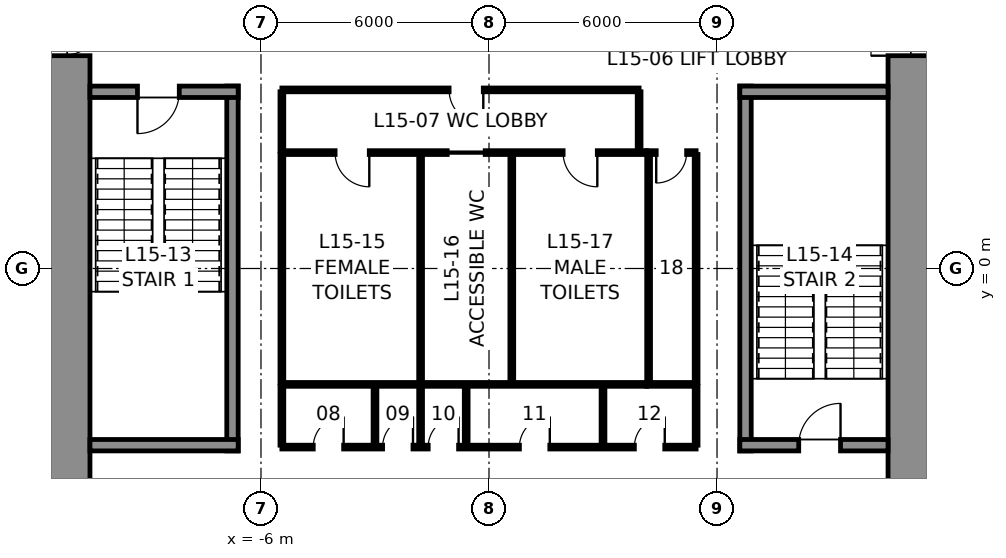
"""IFC4 building model, lengths in metres.
Left out: names, types, materials, properties, quantities, classifications, styles, units other than length and angle.
Written with IfcOpenShell. Run it as: python <this file> out.ifc"""

import sys

from ifc_helpers import new_model, si_unit, direction, frame, frame_2d, origin, place, context, subcontext, project, spatial, rectangle, extrude, element, fill, save


model = new_model("IFC4")
c1 = context("Model", 3, precision=1e-05, world=origin(), true_north=direction((0.0, 1.0)))
c2 = subcontext(c1, "Body", "Model", "MODEL_VIEW")
j1 = project(units=[si_unit("LENGTHUNIT", "METRE"), si_unit("PLANEANGLEUNIT", "RADIAN")], contexts=[c1])
p1 = place(None, origin())
s1 = spatial("IfcSite", under=j1, at=p1, CompositionType="ELEMENT")
p2 = place(p1, origin())
s2 = spatial("IfcBuilding", under=s1, at=p2, CompositionType="ELEMENT")
p3 = place(p2, frame((0.0, 0.0, 81.0)))
s3 = spatial("IfcBuildingStorey", under=s2, at=p3, CompositionType="ELEMENT", Elevation=81.0)
p4 = place(p3, frame((11.25, 10.5, 0.0), z_axis=(0.0, 0.0, 1.0), x_axis=(0.0, -1.0, 0.0)))
e1 = element("IfcWall", 1, at=p4, inside=s3, PredefinedType="SHEAR", context=c2, shape_type="SweptSolid", body=[
    extrude(rectangle(XDim=21.0, YDim=1.5, at=frame_2d((10.5, 0.0))), origin(), (0.0, 0.0, 1.0), 5.0),
])
p5 = place(p4, frame((3.7, 0.0, 0.0)))
e2 = element("IfcOpeningElement", 2, at=p5, cuts=e1, PredefinedType="OPENING", context=c2, shape_type="SweptSolid", body=[
    extrude(rectangle(XDim=1.2, YDim=2.3, at=frame_2d((0.6, 1.15))), frame((0.0, 0.76, 0.0), z_axis=(0.0, -1.0, 0.0), x_axis=(1.0, 0.0, 0.0)), (0.0, 0.0, 1.0), 1.52),
])
p6 = place(p4, frame((16.1, 0.0, 0.0)))
e3 = element("IfcOpeningElement", 3, at=p6, cuts=e1, PredefinedType="OPENING", context=c2, shape_type="SweptSolid", body=[
    extrude(rectangle(XDim=1.2, YDim=2.3, at=frame_2d((0.6, 1.15))), frame((0.0, 0.76, 0.0), z_axis=(0.0, -1.0, 0.0), x_axis=(1.0, 0.0, 0.0)), (0.0, 0.0, 1.0), 1.52),
])
p7 = place(p3, frame((-11.25, -10.5, 0.0), z_axis=(0.0, 0.0, 1.0), x_axis=(0.0, 1.0, 0.0)))
e4 = element("IfcWall", 4, at=p7, inside=s3, PredefinedType="SHEAR", context=c2, shape_type="SweptSolid", body=[
    extrude(rectangle(XDim=21.0, YDim=1.5, at=frame_2d((10.5, 0.0))), origin(), (0.0, 0.0, 1.0), 5.0),
])
p8 = place(p7, frame((16.1, 0.0, 0.0)))
e5 = element("IfcOpeningElement", 5, at=p8, cuts=e4, PredefinedType="OPENING", context=c2, shape_type="SweptSolid", body=[
    extrude(rectangle(XDim=1.2, YDim=2.3, at=frame_2d((0.6, 1.15))), frame((0.0, 0.76, 0.0), z_axis=(0.0, -1.0, 0.0), x_axis=(1.0, 0.0, 0.0)), (0.0, 0.0, 1.0), 1.52),
])
p9 = place(p7, frame((3.7, 0.0, 0.0)))
e6 = element("IfcOpeningElement", 6, at=p9, cuts=e4, PredefinedType="OPENING", context=c2, shape_type="SweptSolid", body=[
    extrude(rectangle(XDim=1.2, YDim=2.3, at=frame_2d((0.6, 1.15))), frame((0.0, 0.76, 0.0), z_axis=(0.0, -1.0, 0.0), x_axis=(1.0, 0.0, 0.0)), (0.0, 0.0, 1.0), 1.52),
])
p10 = place(p3, frame((-6.75, -4.8, 0.0), z_axis=(0.0, 0.0, 1.0), x_axis=(0.0, 1.0, 0.0)))
e7 = element("IfcWall", 7, at=p10, inside=s3, PredefinedType="SOLIDWALL", context=c2, shape_type="SweptSolid", body=[
    extrude(rectangle(XDim=9.6, YDim=0.3, at=frame_2d((4.8, 0.0))), origin(), (0.0, 0.0, 1.0), 4.75),
])
p11 = place(p3, frame((-10.5, 4.65, 0.0), z_axis=(0.0, 0.0, 1.0), x_axis=(1.0, 0.0, 0.0)))
e8 = element("IfcWall", 8, at=p11, inside=s3, PredefinedType="SOLIDWALL", context=c2, shape_type="SweptSolid", body=[
    extrude(rectangle(XDim=3.9, YDim=0.3, at=frame_2d((1.95, 0.0))), origin(), (0.0, 0.0, 1.0), 4.75),
])
p12 = place(p11, frame((1.25, 0.0, 0.0)))
e9 = element("IfcOpeningElement", 9, at=p12, cuts=e8, PredefinedType="OPENING", context=c2, shape_type="SweptSolid", body=[
    extrude(rectangle(XDim=1.1, YDim=2.3, at=frame_2d((0.55, 1.15))), frame((0.0, 0.16, 0.0), z_axis=(0.0, -1.0, 0.0), x_axis=(1.0, 0.0, 0.0)), (0.0, 0.0, 1.0), 0.32),
])
p13 = place(p3, frame((-6.6, -4.65, 0.0), z_axis=(0.0, 0.0, 1.0), x_axis=(-1.0, 0.0, 0.0)))
e10 = element("IfcWall", 10, at=p13, inside=s3, PredefinedType="SOLIDWALL", context=c2, shape_type="SweptSolid", body=[
    extrude(rectangle(XDim=3.9, YDim=0.3, at=frame_2d((1.95, 0.0))), origin(), (0.0, 0.0, 1.0), 4.75),
])
p14 = place(p3, frame((6.75, -4.8, 0.0), z_axis=(0.0, 0.0, 1.0), x_axis=(0.0, 1.0, 0.0)))
e11 = element("IfcWall", 11, at=p14, inside=s3, PredefinedType="SOLIDWALL", context=c2, shape_type="SweptSolid", body=[
    extrude(rectangle(XDim=9.6, YDim=0.3, at=frame_2d((4.8, 0.0))), origin(), (0.0, 0.0, 1.0), 4.75),
])
p15 = place(p3, frame((6.6, 4.65, 0.0), z_axis=(0.0, 0.0, 1.0), x_axis=(1.0, 0.0, 0.0)))
e12 = element("IfcWall", 12, at=p15, inside=s3, PredefinedType="SOLIDWALL", context=c2, shape_type="SweptSolid", body=[
    extrude(rectangle(XDim=3.9, YDim=0.3, at=frame_2d((1.95, 0.0))), origin(), (0.0, 0.0, 1.0), 4.75),
])
p16 = place(p3, frame((10.5, -4.65, 0.0), z_axis=(0.0, 0.0, 1.0), x_axis=(-1.0, 0.0, 0.0)))
e13 = element("IfcWall", 13, at=p16, inside=s3, PredefinedType="SOLIDWALL", context=c2, shape_type="SweptSolid", body=[
    extrude(rectangle(XDim=3.9, YDim=0.3, at=frame_2d((1.95, 0.0))), origin(), (0.0, 0.0, 1.0), 4.75),
])
p17 = place(p16, frame((1.25, 0.0, 0.0)))
e14 = element("IfcOpeningElement", 14, at=p17, cuts=e13, PredefinedType="OPENING", context=c2, shape_type="SweptSolid", body=[
    extrude(rectangle(XDim=1.1, YDim=2.3, at=frame_2d((0.55, 1.15))), frame((0.0, 0.16, 0.0), z_axis=(0.0, -1.0, 0.0), x_axis=(1.0, 0.0, 0.0)), (0.0, 0.0, 1.0), 0.32),
])
p18 = place(p3, frame((-5.45, 3.05, 0.0), z_axis=(0.0, 0.0, 1.0), x_axis=(1.0, 0.0, 0.0)))
e15 = element("IfcWall", 15, at=p18, inside=s3, PredefinedType="PARTITIONING", context=c2, shape_type="SweptSolid", body=[
    extrude(rectangle(XDim=9.6, YDim=0.1, at=frame_2d((4.8, 0.0))), origin(), (0.0, 0.0, 1.0), 4.75),
])
p19 = place(p18, frame((1.4, 0.0, 0.0)))
e16 = element("IfcOpeningElement", 16, at=p19, cuts=e15, PredefinedType="OPENING", context=c2, shape_type="SweptSolid", body=[
    extrude(rectangle(XDim=0.9, YDim=2.3, at=frame_2d((0.45, 1.15))), frame((0.0, 0.06, 0.0), z_axis=(0.0, -1.0, 0.0), x_axis=(1.0, 0.0, 0.0)), (0.0, 0.0, 1.0), 0.12),
])
p20 = place(p18, frame((4.35, 0.0, 0.0)))
e17 = element("IfcOpeningElement", 17, at=p20, cuts=e15, PredefinedType="OPENING", context=c2, shape_type="SweptSolid", body=[
    extrude(rectangle(XDim=1.0, YDim=2.3, at=frame_2d((0.5, 1.15))), frame((0.0, 0.06, 0.0), z_axis=(0.0, -1.0, 0.0), x_axis=(1.0, 0.0, 0.0)), (0.0, 0.0, 1.0), 0.12),
])
p21 = place(p18, frame((7.4, 0.0, 0.0)))
e18 = element("IfcOpeningElement", 18, at=p21, cuts=e15, PredefinedType="OPENING", context=c2, shape_type="SweptSolid", body=[
    extrude(rectangle(XDim=0.9, YDim=2.3, at=frame_2d((0.45, 1.15))), frame((0.0, 0.06, 0.0), z_axis=(0.0, -1.0, 0.0), x_axis=(1.0, 0.0, 0.0)), (0.0, 0.0, 1.0), 0.12),
])
p22 = place(p3, frame((4.15, 3.05, 0.0), z_axis=(0.0, 0.0, 1.0), x_axis=(1.0, 0.0, 0.0)))
e19 = element("IfcWall", 19, at=p22, inside=s3, PredefinedType="PARTITIONING", context=c2, shape_type="SweptSolid", body=[
    extrude(rectangle(XDim=1.3, YDim=0.1, at=frame_2d((0.65, 0.0))), origin(), (0.0, 0.0, 1.0), 4.75),
])
p23 = place(p22, frame((0.25, 0.0, 0.0)))
e20 = element("IfcOpeningElement", 20, at=p23, cuts=e19, PredefinedType="OPENING", context=c2, shape_type="SweptSolid", body=[
    extrude(rectangle(XDim=0.8, YDim=2.3, at=frame_2d((0.4, 1.15))), frame((0.0, 0.06, 0.0), z_axis=(0.0, -1.0, 0.0), x_axis=(1.0, 0.0, 0.0)), (0.0, 0.0, 1.0), 0.12),
])
p24 = place(p3, frame((4.15, -3.05, 0.0), z_axis=(0.0, 0.0, 1.0), x_axis=(-1.0, 0.0, 0.0)))
e21 = element("IfcWall", 21, at=p24, inside=s3, PredefinedType="PARTITIONING", context=c2, shape_type="SweptSolid", body=[
    extrude(rectangle(XDim=9.6, YDim=0.1, at=frame_2d((4.8, 0.0))), origin(), (0.0, 0.0, 1.0), 4.75),
])
p25 = place(p3, frame((5.45, -3.05, 0.0), z_axis=(0.0, 0.0, 1.0), x_axis=(-1.0, 0.0, 0.0)))
e22 = element("IfcWall", 22, at=p25, inside=s3, PredefinedType="PARTITIONING", context=c2, shape_type="SweptSolid", body=[
    extrude(rectangle(XDim=1.3, YDim=0.1, at=frame_2d((0.65, 0.0))), origin(), (0.0, 0.0, 1.0), 4.75),
])
for number, where, z_axis, x_axis in (
    (23, (5.45, 3.0, 0.0), (0.0, 0.0, 1.0), (0.0, -1.0, 0.0)),
    (24, (-5.45, -3.0, 0.0), (0.0, 0.0, 1.0), (0.0, 1.0, 0.0)),
    (25, (-1.8, -3.0, 0.0), (0.0, 0.0, 1.0), (0.0, 1.0, 0.0)),
    (26, (0.6, -3.0, 0.0), (0.0, 0.0, 1.0), (0.0, 1.0, 0.0)),
    (27, (4.2, -3.0, 0.0), (0.0, 0.0, 1.0), (0.0, 1.0, 0.0)),
):
    element("IfcWall", number, at=place(p3, frame(where, z_axis=z_axis, x_axis=x_axis)), inside=s3, PredefinedType="PARTITIONING", context=c2, shape_type="SweptSolid", body=[
        extrude(rectangle(XDim=6.0, YDim=0.1, at=frame_2d((3.0, 0.0))), origin(), (0.0, 0.0, 1.0), 4.75),
    ])
p26 = place(p3, frame((-5.45, 4.7, 0.0), z_axis=(0.0, 0.0, 1.0), x_axis=(1.0, 0.0, 0.0)))
e28 = element("IfcWall", 28, at=p26, inside=s3, PredefinedType="PARTITIONING", context=c2, shape_type="SweptSolid", body=[
    extrude(rectangle(XDim=9.4, YDim=0.1, at=frame_2d((4.7, 0.0))), origin(), (0.0, 0.0, 1.0), 4.75),
])
p27 = place(p26, frame((4.4, 0.0, 0.0)))
e29 = element("IfcOpeningElement", 29, at=p27, cuts=e28, PredefinedType="OPENING", context=c2, shape_type="SweptSolid", body=[
    extrude(rectangle(XDim=0.9, YDim=2.3, at=frame_2d((0.45, 1.15))), frame((0.0, 0.06, 0.0), z_axis=(0.0, -1.0, 0.0), x_axis=(1.0, 0.0, 0.0)), (0.0, 0.0, 1.0), 0.12),
])
for number, where, z_axis, x_axis in (
    (30, (-5.45, 3.1, 0.0), (0.0, 0.0, 1.0), (0.0, 1.0, 0.0)),
    (31, (3.95, 3.1, 0.0), (0.0, 0.0, 1.0), (0.0, 1.0, 0.0)),
):
    element("IfcWall", number, at=place(p3, frame(where, z_axis=z_axis, x_axis=x_axis)), inside=s3, PredefinedType="PARTITIONING", context=c2, shape_type="SweptSolid", body=[
        extrude(rectangle(XDim=1.55, YDim=0.1, at=frame_2d((0.775, 0.0))), origin(), (0.0, 0.0, 1.0), 4.75),
    ])
p28 = place(p3, frame((5.45, -4.7, 0.0), z_axis=(0.0, 0.0, 1.0), x_axis=(-1.0, 0.0, 0.0)))
e32 = element("IfcWall", 32, at=p28, inside=s3, PredefinedType="PARTITIONING", context=c2, shape_type="SweptSolid", body=[
    extrude(rectangle(XDim=10.9, YDim=0.1, at=frame_2d((5.45, 0.0))), origin(), (0.0, 0.0, 1.0), 4.75),
])
p29 = place(p28, frame((9.275, 0.0, 0.0)))
e33 = element("IfcOpeningElement", 33, at=p29, cuts=e32, PredefinedType="OPENING", context=c2, shape_type="SweptSolid", body=[
    extrude(rectangle(XDim=0.8, YDim=2.3, at=frame_2d((0.4, 1.15))), frame((0.0, 0.06, 0.0), z_axis=(0.0, -1.0, 0.0), x_axis=(1.0, 0.0, 0.0)), (0.0, 0.0, 1.0), 0.12),
])
p30 = place(p28, frame((7.45, 0.0, 0.0)))
e34 = element("IfcOpeningElement", 34, at=p30, cuts=e32, PredefinedType="OPENING", context=c2, shape_type="SweptSolid", body=[
    extrude(rectangle(XDim=0.8, YDim=2.3, at=frame_2d((0.4, 1.15))), frame((0.0, 0.06, 0.0), z_axis=(0.0, -1.0, 0.0), x_axis=(1.0, 0.0, 0.0)), (0.0, 0.0, 1.0), 0.12),
])
p31 = place(p28, frame((6.25, 0.0, 0.0)))
e35 = element("IfcOpeningElement", 35, at=p31, cuts=e32, PredefinedType="OPENING", context=c2, shape_type="SweptSolid", body=[
    extrude(rectangle(XDim=0.8, YDim=2.3, at=frame_2d((0.4, 1.15))), frame((0.0, 0.06, 0.0), z_axis=(0.0, -1.0, 0.0), x_axis=(1.0, 0.0, 0.0)), (0.0, 0.0, 1.0), 0.12),
])
p32 = place(p28, frame((3.85, 0.0, 0.0)))
e36 = element("IfcOpeningElement", 36, at=p32, cuts=e32, PredefinedType="OPENING", context=c2, shape_type="SweptSolid", body=[
    extrude(rectangle(XDim=0.8, YDim=2.3, at=frame_2d((0.4, 1.15))), frame((0.0, 0.06, 0.0), z_axis=(0.0, -1.0, 0.0), x_axis=(1.0, 0.0, 0.0)), (0.0, 0.0, 1.0), 0.12),
])
p33 = place(p28, frame((0.825, 0.0, 0.0)))
e37 = element("IfcOpeningElement", 37, at=p33, cuts=e32, PredefinedType="OPENING", context=c2, shape_type="SweptSolid", body=[
    extrude(rectangle(XDim=0.8, YDim=2.3, at=frame_2d((0.4, 1.15))), frame((0.0, 0.06, 0.0), z_axis=(0.0, -1.0, 0.0), x_axis=(1.0, 0.0, 0.0)), (0.0, 0.0, 1.0), 0.12),
])
for number, where, z_axis, x_axis in (
    (38, (-5.45, -3.1, 0.0), (0.0, 0.0, 1.0), (0.0, -1.0, 0.0)),
    (39, (5.45, -3.1, 0.0), (0.0, 0.0, 1.0), (0.0, -1.0, 0.0)),
    (40, (-3.0, -3.1, 0.0), (0.0, 0.0, 1.0), (0.0, -1.0, 0.0)),
    (41, (-1.8, -3.1, 0.0), (0.0, 0.0, 1.0), (0.0, -1.0, 0.0)),
    (42, (-0.6, -3.1, 0.0), (0.0, 0.0, 1.0), (0.0, -1.0, 0.0)),
    (43, (3.0, -3.1, 0.0), (0.0, 0.0, 1.0), (0.0, -1.0, 0.0)),
):
    element("IfcWall", number, at=place(p3, frame(where, z_axis=z_axis, x_axis=x_axis)), inside=s3, PredefinedType="PARTITIONING", context=c2, shape_type="SweptSolid", body=[
        extrude(rectangle(XDim=1.55, YDim=0.1, at=frame_2d((0.775, 0.0))), origin(), (0.0, 0.0, 1.0), 4.75),
    ])
p34 = place(p12, frame((1.1, 0.0, 0.0), z_axis=(0.0, 0.0, 1.0), x_axis=(-1.0, 0.0, 0.0)))
e44 = element("IfcDoor", 44, at=p34, inside=s3, OperationType="SINGLE_SWING_RIGHT", PredefinedType="DOOR", context=c2, shape_type="SweptSolid", body=[
    extrude(rectangle(XDim=1.1, YDim=2.3, at=frame_2d((0.55, 1.15))), frame((0.0, 0.025, 0.0), z_axis=(0.0, -1.0, 0.0), x_axis=(1.0, 0.0, 0.0)), (0.0, 0.0, 1.0), 0.05),
])
fill(e9, e44)
p35 = place(p17, frame((1.1, 0.0, 0.0), z_axis=(0.0, 0.0, 1.0), x_axis=(-1.0, 0.0, 0.0)))
e45 = element("IfcDoor", 45, at=p35, inside=s3, OperationType="SINGLE_SWING_RIGHT", PredefinedType="DOOR", context=c2, shape_type="SweptSolid", body=[
    extrude(rectangle(XDim=1.1, YDim=2.3, at=frame_2d((0.55, 1.15))), frame((0.0, 0.025, 0.0), z_axis=(0.0, -1.0, 0.0), x_axis=(1.0, 0.0, 0.0)), (0.0, 0.0, 1.0), 0.05),
])
fill(e14, e45)
p36 = place(p19, frame((0.9, 0.0, 0.0), z_axis=(0.0, 0.0, 1.0), x_axis=(-1.0, 0.0, 0.0)))
e46 = element("IfcDoor", 46, at=p36, inside=s3, OperationType="SINGLE_SWING_LEFT", PredefinedType="DOOR", context=c2, shape_type="SweptSolid", body=[
    extrude(rectangle(XDim=0.9, YDim=2.3, at=frame_2d((0.45, 1.15))), frame((0.0, 0.025, 0.0), z_axis=(0.0, -1.0, 0.0), x_axis=(1.0, 0.0, 0.0)), (0.0, 0.0, 1.0), 0.05),
])
fill(e16, e46)
p37 = place(p20, frame((1.0, 0.0, 0.0), z_axis=(0.0, 0.0, 1.0), x_axis=(-1.0, 0.0, 0.0)))
e47 = element("IfcDoor", 47, at=p37, inside=s3, OperationType="SLIDING_TO_LEFT", PredefinedType="DOOR", context=c2, shape_type="SweptSolid", body=[
    extrude(rectangle(XDim=1.0, YDim=2.3, at=frame_2d((0.5, 1.15))), frame((0.0, 0.025, 0.0), z_axis=(0.0, -1.0, 0.0), x_axis=(1.0, 0.0, 0.0)), (0.0, 0.0, 1.0), 0.05),
])
fill(e17, e47)
p38 = place(p21, frame((0.9, 0.0, 0.0), z_axis=(0.0, 0.0, 1.0), x_axis=(-1.0, 0.0, 0.0)))
e48 = element("IfcDoor", 48, at=p38, inside=s3, OperationType="SINGLE_SWING_LEFT", PredefinedType="DOOR", context=c2, shape_type="SweptSolid", body=[
    extrude(rectangle(XDim=0.9, YDim=2.3, at=frame_2d((0.45, 1.15))), frame((0.0, 0.025, 0.0), z_axis=(0.0, -1.0, 0.0), x_axis=(1.0, 0.0, 0.0)), (0.0, 0.0, 1.0), 0.05),
])
fill(e18, e48)
p39 = place(p23, frame((0.8, 0.0, 0.0), z_axis=(0.0, 0.0, 1.0), x_axis=(-1.0, 0.0, 0.0)))
e49 = element("IfcDoor", 49, at=p39, inside=s3, OperationType="SINGLE_SWING_RIGHT", PredefinedType="DOOR", context=c2, shape_type="SweptSolid", body=[
    extrude(rectangle(XDim=0.8, YDim=2.3, at=frame_2d((0.4, 1.15))), frame((0.0, 0.025, 0.0), z_axis=(0.0, -1.0, 0.0), x_axis=(1.0, 0.0, 0.0)), (0.0, 0.0, 1.0), 0.05),
])
fill(e20, e49)
p40 = place(p27, frame((0.9, 0.0, 0.0), z_axis=(0.0, 0.0, 1.0), x_axis=(-1.0, 0.0, 0.0)))
e50 = element("IfcDoor", 50, at=p40, inside=s3, OperationType="SINGLE_SWING_LEFT", PredefinedType="DOOR", context=c2, shape_type="SweptSolid", body=[
    extrude(rectangle(XDim=0.9, YDim=2.3, at=frame_2d((0.45, 1.15))), frame((0.0, 0.025, 0.0), z_axis=(0.0, -1.0, 0.0), x_axis=(1.0, 0.0, 0.0)), (0.0, 0.0, 1.0), 0.05),
])
fill(e29, e50)
p41 = place(p29, frame((0.8, 0.0, 0.0), z_axis=(0.0, 0.0, 1.0), x_axis=(-1.0, 0.0, 0.0)))
e51 = element("IfcDoor", 51, at=p41, inside=s3, OperationType="SINGLE_SWING_RIGHT", PredefinedType="DOOR", context=c2, shape_type="SweptSolid", body=[
    extrude(rectangle(XDim=0.8, YDim=2.3, at=frame_2d((0.4, 1.15))), frame((0.0, 0.025, 0.0), z_axis=(0.0, -1.0, 0.0), x_axis=(1.0, 0.0, 0.0)), (0.0, 0.0, 1.0), 0.05),
])
fill(e33, e51)
p42 = place(p30, frame((0.8, 0.0, 0.0), z_axis=(0.0, 0.0, 1.0), x_axis=(-1.0, 0.0, 0.0)))
e52 = element("IfcDoor", 52, at=p42, inside=s3, OperationType="SINGLE_SWING_RIGHT", PredefinedType="DOOR", context=c2, shape_type="SweptSolid", body=[
    extrude(rectangle(XDim=0.8, YDim=2.3, at=frame_2d((0.4, 1.15))), frame((0.0, 0.025, 0.0), z_axis=(0.0, -1.0, 0.0), x_axis=(1.0, 0.0, 0.0)), (0.0, 0.0, 1.0), 0.05),
])
fill(e34, e52)
p43 = place(p31, frame((0.8, 0.0, 0.0), z_axis=(0.0, 0.0, 1.0), x_axis=(-1.0, 0.0, 0.0)))
e53 = element("IfcDoor", 53, at=p43, inside=s3, OperationType="SINGLE_SWING_RIGHT", PredefinedType="DOOR", context=c2, shape_type="SweptSolid", body=[
    extrude(rectangle(XDim=0.8, YDim=2.3, at=frame_2d((0.4, 1.15))), frame((0.0, 0.025, 0.0), z_axis=(0.0, -1.0, 0.0), x_axis=(1.0, 0.0, 0.0)), (0.0, 0.0, 1.0), 0.05),
])
fill(e35, e53)
p44 = place(p32, frame((0.8, 0.0, 0.0), z_axis=(0.0, 0.0, 1.0), x_axis=(-1.0, 0.0, 0.0)))
e54 = element("IfcDoor", 54, at=p44, inside=s3, OperationType="SINGLE_SWING_RIGHT", PredefinedType="DOOR", context=c2, shape_type="SweptSolid", body=[
    extrude(rectangle(XDim=0.8, YDim=2.3, at=frame_2d((0.4, 1.15))), frame((0.0, 0.025, 0.0), z_axis=(0.0, -1.0, 0.0), x_axis=(1.0, 0.0, 0.0)), (0.0, 0.0, 1.0), 0.05),
])
fill(e36, e54)
p45 = place(p33, frame((0.8, 0.0, 0.0), z_axis=(0.0, 0.0, 1.0), x_axis=(-1.0, 0.0, 0.0)))
e55 = element("IfcDoor", 55, at=p45, inside=s3, OperationType="SINGLE_SWING_RIGHT", PredefinedType="DOOR", context=c2, shape_type="SweptSolid", body=[
    extrude(rectangle(XDim=0.8, YDim=2.3, at=frame_2d((0.4, 1.15))), frame((0.0, 0.025, 0.0), z_axis=(0.0, -1.0, 0.0), x_axis=(1.0, 0.0, 0.0)), (0.0, 0.0, 1.0), 0.05),
])
fill(e37, e55)
p46 = place(p8, frame((1.2, 0.0, 0.0), z_axis=(0.0, 0.0, 1.0), x_axis=(-1.0, 0.0, 0.0)))
e56 = element("IfcDoor", 56, at=p46, inside=s3, OperationType="SINGLE_SWING_LEFT", PredefinedType="DOOR", context=c2, shape_type="SweptSolid", body=[
    extrude(rectangle(XDim=1.2, YDim=2.3, at=frame_2d((0.6, 1.15))), frame((0.0, 0.025, 0.0), z_axis=(0.0, -1.0, 0.0), x_axis=(1.0, 0.0, 0.0)), (0.0, 0.0, 1.0), 0.05),
])
fill(e5, e56)
p47 = place(p5, frame((1.2, 0.0, 0.0), z_axis=(0.0, 0.0, 1.0), x_axis=(-1.0, 0.0, 0.0)))
e57 = element("IfcDoor", 57, at=p47, inside=s3, OperationType="SINGLE_SWING_LEFT", PredefinedType="DOOR", context=c2, shape_type="SweptSolid", body=[
    extrude(rectangle(XDim=1.2, YDim=2.3, at=frame_2d((0.6, 1.15))), frame((0.0, 0.025, 0.0), z_axis=(0.0, -1.0, 0.0), x_axis=(1.0, 0.0, 0.0)), (0.0, 0.0, 1.0), 0.05),
])
fill(e2, e57)
save(model, sys.argv[1])
